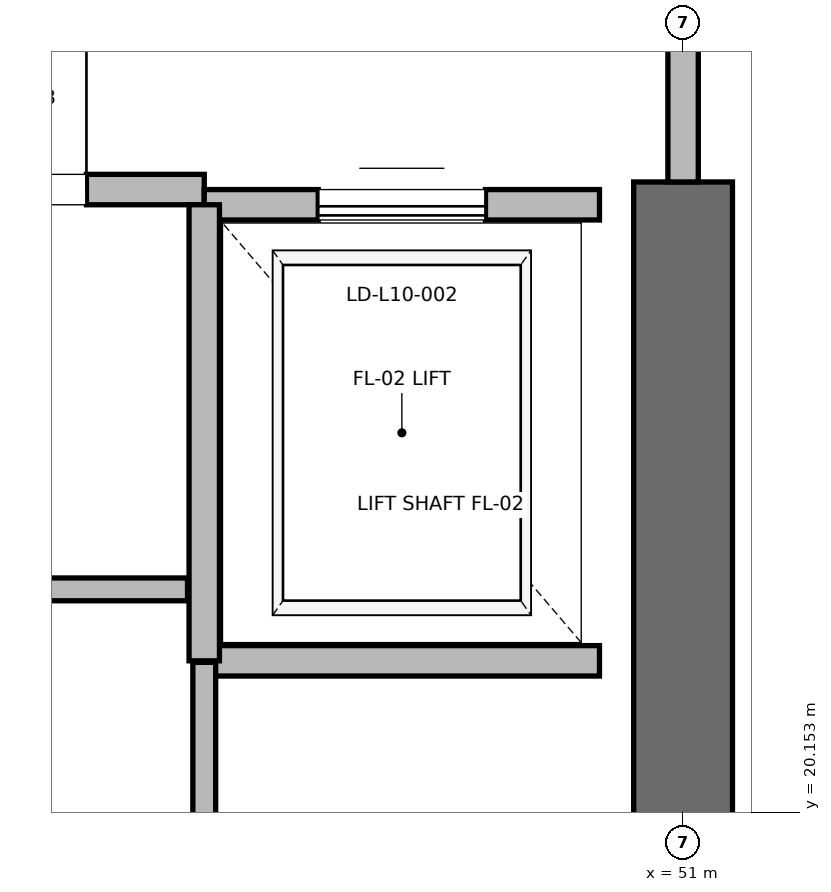
"""IFC4 building model, lengths in metres.
Left out: names, types, materials, properties, quantities, classifications, styles, units other than length and angle.
Written with IfcOpenShell. Run it as: python <this file> out.ifc"""

import sys

from ifc_helpers import new_model, si_unit, direction, frame, frame_2d, origin, place, context, subcontext, project, spatial, rectangle, extrude, element, fill, save


model = new_model("IFC4")
c1 = context("Model", 3, precision=1e-05, world=origin(), true_north=direction((0.0, 1.0)))
c2 = subcontext(c1, "Body", "Model", "MODEL_VIEW")
j1 = project(units=[si_unit("LENGTHUNIT", "METRE"), si_unit("PLANEANGLEUNIT", "RADIAN")], contexts=[c1])
p1 = place(None, origin())
s1 = spatial("IfcSite", under=j1, at=p1, CompositionType="ELEMENT")
p2 = place(p1, origin())
s2 = spatial("IfcBuilding", under=s1, at=p2, CompositionType="ELEMENT")
p3 = place(p2, frame((0.0, 0.0, 47.6)))
s3 = spatial("IfcBuildingStorey", under=s2, at=p3, CompositionType="ELEMENT", Elevation=47.6)
p4 = place(p3, frame((51.0, 18.5, 0.0), z_axis=(0.0, 0.0, 1.0), x_axis=(0.0, 1.0, 0.0)))
e1 = element("IfcWall", 1, at=p4, inside=s3, PredefinedType="SHEAR", context=c2, shape_type="SweptSolid", body=[
    extrude(rectangle(XDim=5.8, YDim=0.65, at=frame_2d((2.9, 0.0))), origin(), (0.0, 0.0, 1.0), 3.76),
])
p5 = place(p3, frame((45.15, 24.25, 0.0), z_axis=(0.0, 0.0, 1.0), x_axis=(1.0, 0.0, 0.0)))
e2 = element("IfcWall", 2, at=p5, inside=s3, PredefinedType="PARTITIONING", context=c2, shape_type="SweptSolid", body=[
    extrude(rectangle(XDim=2.7, YDim=0.2, at=frame_2d((1.35, 0.0))), origin(), (0.0, 0.0, 1.0), 3.76),
])
p6 = place(p5, frame((0.775, 0.0, 0.0)))
e3 = element("IfcOpeningElement", 3, at=p6, cuts=e2, PredefinedType="OPENING", context=c2, shape_type="SweptSolid", body=[
    extrude(rectangle(XDim=1.15, YDim=2.2, at=frame_2d((0.575, 1.1))), frame((0.0, 0.1, 0.0), z_axis=(0.0, -1.0, 0.0), x_axis=(1.0, 0.0, 0.0)), (0.0, 0.0, 1.0), 0.2),
])
p7 = place(p3, frame((51.0, 24.3, 0.0), z_axis=(0.0, 0.0, 1.0), x_axis=(0.0, 1.0, 0.0)))
e4 = element("IfcWall", 4, at=p7, inside=s3, PredefinedType="PARTITIONING", context=c2, shape_type="SweptSolid", body=[
    extrude(rectangle(XDim=3.4, YDim=0.2, at=frame_2d((1.7, 0.0))), origin(), (0.0, 0.0, 1.0), 2.54),
])
p8 = place(p7, frame((1.125, 0.0, 0.0)))
e5 = element("IfcOpeningElement", 5, at=p8, cuts=e4, PredefinedType="OPENING", context=c2, shape_type="SweptSolid", body=[
    extrude(rectangle(XDim=1.15, YDim=2.2, at=frame_2d((0.575, 1.1))), frame((0.0, 0.1, 0.0), z_axis=(0.0, -1.0, 0.0), x_axis=(1.0, 0.0, 0.0)), (0.0, 0.0, 1.0), 0.2),
])
p9 = place(p3, frame((47.85, 21.15, 0.0), z_axis=(0.0, 0.0, 1.0), x_axis=(1.0, 0.0, 0.0)))
e6 = element("IfcWall", 6, at=p9, inside=s3, PredefinedType="SOLIDWALL", context=c2, shape_type="SweptSolid", body=[
    extrude(rectangle(XDim=2.6, YDim=0.2, at=frame_2d((1.3, 0.0))), origin(), (0.0, 0.0, 1.0), 3.76),
])
p10 = place(p3, frame((50.45, 24.15, 0.0), z_axis=(0.0, 0.0, 1.0), x_axis=(-1.0, 0.0, 0.0)))
e7 = element("IfcWall", 7, at=p10, inside=s3, PredefinedType="SOLIDWALL", context=c2, shape_type="SweptSolid", body=[
    extrude(rectangle(XDim=2.6, YDim=0.2, at=frame_2d((1.3, 0.0))), origin(), (0.0, 0.0, 1.0), 2.54),
])
p11 = place(p10, frame((0.75, 0.0, 0.0)))
e8 = element("IfcOpeningElement", 8, at=p11, cuts=e7, PredefinedType="OPENING", context=c2, shape_type="SweptSolid", body=[
    extrude(rectangle(XDim=1.1, YDim=2.2, at=frame_2d((0.55, 1.1))), frame((0.0, 0.1, 0.0), z_axis=(0.0, -1.0, 0.0), x_axis=(1.0, 0.0, 0.0)), (0.0, 0.0, 1.0), 0.2),
])
p12 = place(p3, frame((47.85, 24.15, 0.0), z_axis=(0.0, 0.0, 1.0), x_axis=(0.0, -1.0, 0.0)))
e9 = element("IfcWall", 9, at=p12, inside=s3, PredefinedType="SOLIDWALL", context=c2, shape_type="SweptSolid", body=[
    extrude(rectangle(XDim=3.0, YDim=0.2, at=frame_2d((1.5, 0.0))), origin(), (0.0, 0.0, 1.0), 3.76),
])
p13 = place(p3, frame((47.85, 18.6, 0.0), z_axis=(0.0, 0.0, 1.0), x_axis=(0.0, 1.0, 0.0)))
e10 = element("IfcWall", 10, at=p13, inside=s3, PredefinedType="PARTITIONING", context=c2, shape_type="SweptSolid", body=[
    extrude(rectangle(XDim=2.54, YDim=0.15, at=frame_2d((1.27, 0.0))), origin(), (0.0, 0.0, 1.0), 2.85),
])
p14 = place(p3, frame((44.8, 21.62, 0.0), z_axis=(0.0, 0.0, 1.0), x_axis=(1.0, 0.0, 0.0)))
e11 = element("IfcWall", 11, at=p14, inside=s3, PredefinedType="PARTITIONING", context=c2, shape_type="SweptSolid", body=[
    extrude(rectangle(XDim=2.94, YDim=0.15, at=frame_2d((1.47, 0.0))), origin(), (0.0, 0.0, 1.0), 2.85),
])
p15 = place(p14, frame((0.97, 0.0, 0.0)))
e12 = element("IfcOpeningElement", 12, at=p15, cuts=e11, PredefinedType="OPENING", context=c2, shape_type="SweptSolid", body=[
    extrude(rectangle(XDim=1.0, YDim=2.15, at=frame_2d((0.5, 1.075))), frame((0.0, 0.075, 0.0), z_axis=(0.0, -1.0, 0.0), x_axis=(1.0, 0.0, 0.0)), (0.0, 0.0, 1.0), 0.15),
])
p16 = place(p6, origin())
e13 = element("IfcDoor", 13, at=p16, inside=s3, OperationType="SINGLE_SWING_RIGHT", PredefinedType="DOOR", context=c2, shape_type="SweptSolid", body=[
    extrude(rectangle(XDim=1.15, YDim=2.2, at=frame_2d((0.575, 1.1))), frame((0.0, 0.025, 0.0), z_axis=(0.0, -1.0, 0.0), x_axis=(1.0, 0.0, 0.0)), (0.0, 0.0, 1.0), 0.05),
])
fill(e3, e13)
p17 = place(p11, origin())
e14 = element("IfcDoor", 14, at=p17, inside=s3, OperationType="SLIDING_TO_RIGHT", PredefinedType="DOOR", context=c2, shape_type="SweptSolid", body=[
    extrude(rectangle(XDim=1.1, YDim=2.2, at=frame_2d((0.55, 1.1))), frame((0.0, 0.025, 0.0), z_axis=(0.0, -1.0, 0.0), x_axis=(1.0, 0.0, 0.0)), (0.0, 0.0, 1.0), 0.05),
])
fill(e8, e14)
save(model, sys.argv[1])
